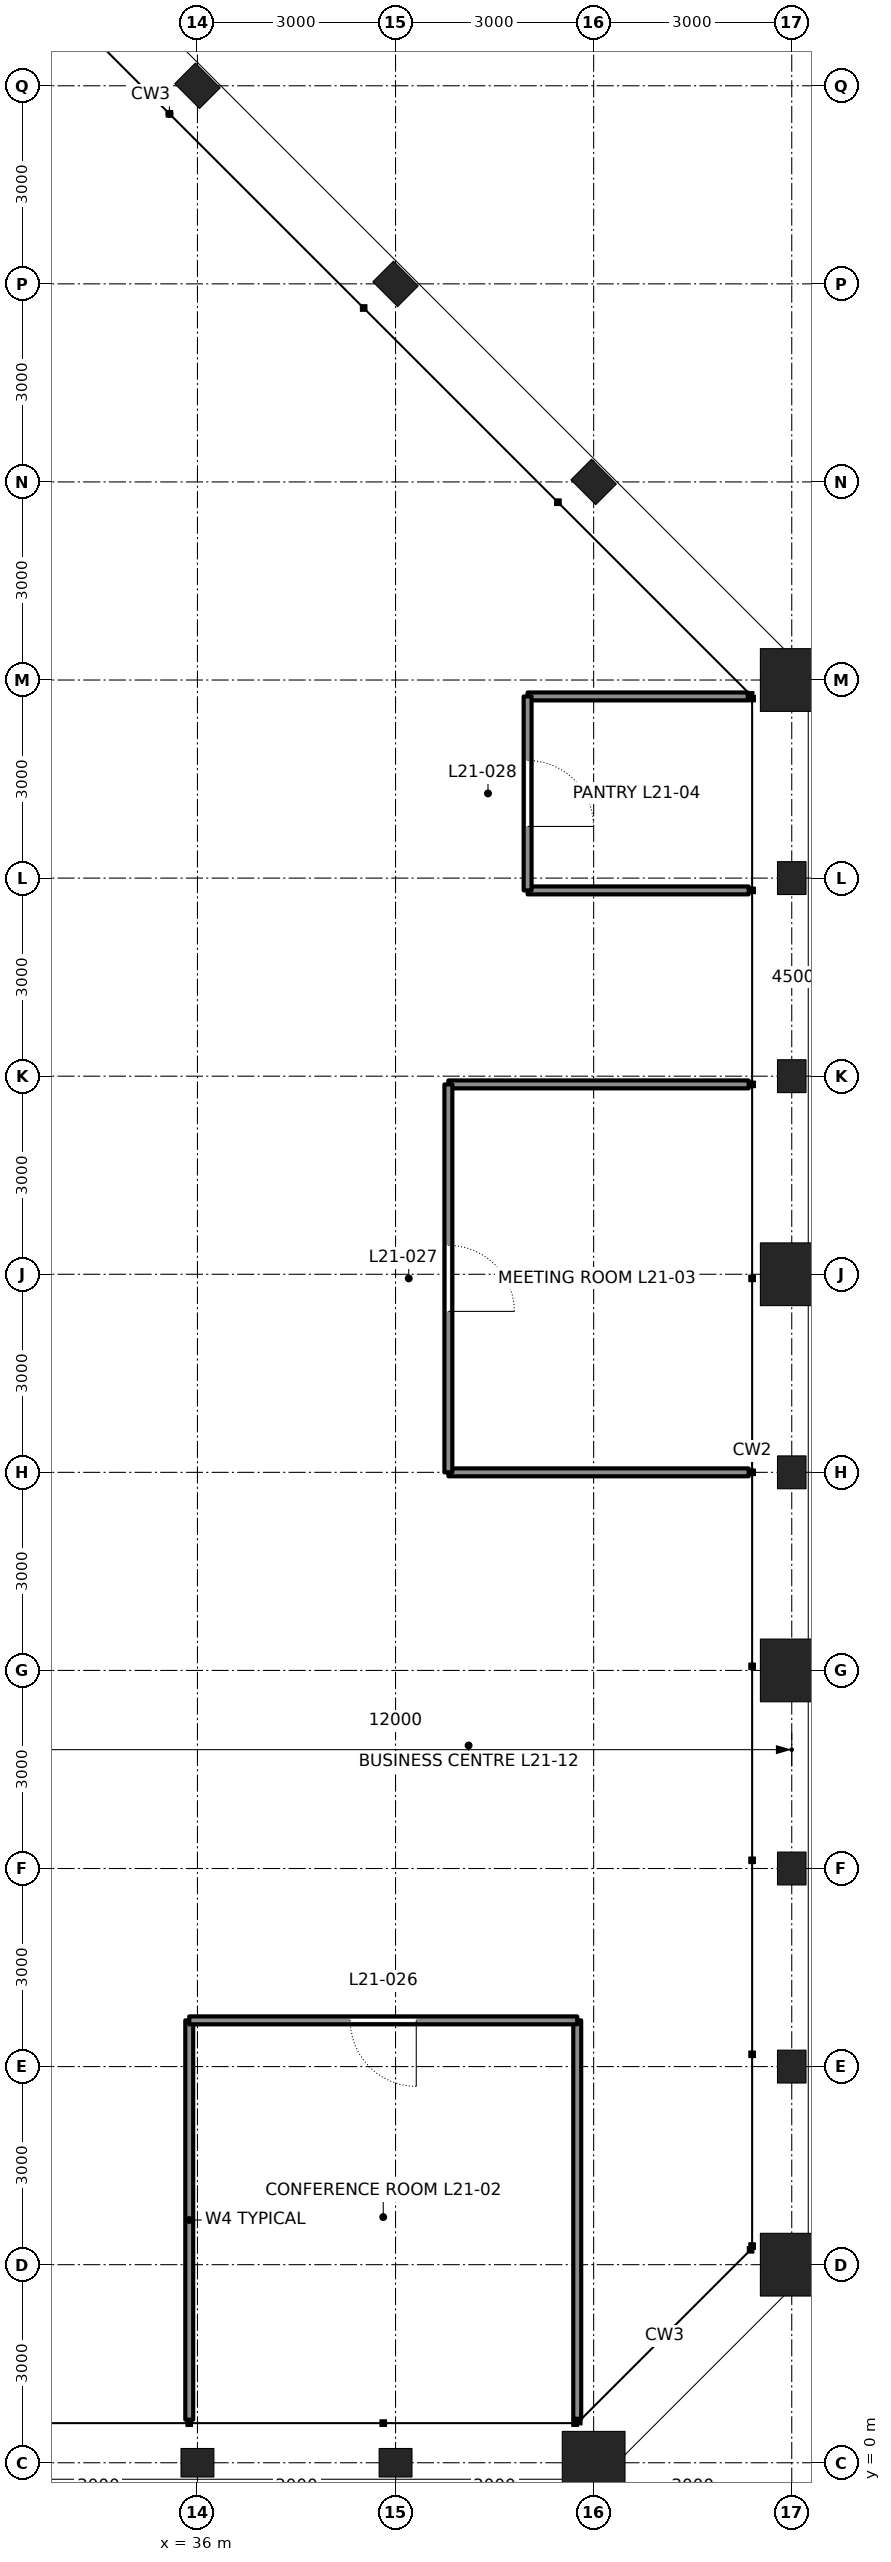
"""IFC4 building model, lengths in metres.
Left out: names, types, materials, properties, quantities, classifications, styles, units other than length and angle.
Written with IfcOpenShell. Run it as: python <this file> out.ifc"""

import sys

from ifc_helpers import new_model, si_unit, direction, frame, frame_2d, origin, origin_2d, place, context, subcontext, project, spatial, rectangle, hollow_rectangle, i_section, extrude, element, fill, save


model = new_model("IFC4")
c1 = context("Model", 3, precision=1e-05, world=origin(), true_north=direction((0.0, 1.0)))
c2 = subcontext(c1, "Body", "Model", "MODEL_VIEW")
j1 = project(units=[si_unit("LENGTHUNIT", "METRE"), si_unit("PLANEANGLEUNIT", "RADIAN")], contexts=[c1])
p1 = place(None, origin())
s1 = spatial("IfcSite", under=j1, at=p1, CompositionType="ELEMENT")
p2 = place(p1, origin())
s2 = spatial("IfcBuilding", under=s1, at=p2, CompositionType="ELEMENT")
p3 = place(p2, frame((0.0, 0.0, 102.3)))
s3 = spatial("IfcBuildingStorey", under=s2, at=p3, CompositionType="ELEMENT", Elevation=102.3)
for number, where, z_axis, x_axis in (
    (1, (36.0, 0.0, 0.0), (0.0, 0.0, 1.0), (0.0, -1.0, 0.0)),
    (2, (39.0, 0.0, 0.0), (0.0, 0.0, 1.0), (0.0, -1.0, 0.0)),
):
    element("IfcColumn", number, at=place(p3, frame(where, z_axis=z_axis, x_axis=x_axis)), inside=s3, PredefinedType="COLUMN", context=c2, shape_type="SweptSolid", body=[
        extrude(i_section(OverallWidth=0.432, OverallDepth=0.498, WebThickness=0.056, FlangeThickness=0.089, at=origin_2d()), origin(), (0.0, 0.0, 1.0), 4.5),
    ])
for number, where, z_axis, x_axis in (
    (3, (42.0, 0.0, 0.0), (0.0, 0.0, 1.0), (0.0, -1.0, 0.0)),
    (4, (45.0, 3.0, 0.0), (0.0, 0.0, 1.0), (1.0, 0.0, 0.0)),
):
    element("IfcColumn", number, at=place(p3, frame(where, z_axis=z_axis, x_axis=x_axis)), inside=s3, PredefinedType="COLUMN", context=c2, shape_type="SweptSolid", body=[
        extrude(hollow_rectangle(XDim=0.95, YDim=0.95, WallThickness=0.095, at=origin_2d()), origin(), (0.0, 0.0, 1.0), 4.5),
    ])
for number, where, z_axis, x_axis in (
    (5, (45.0, 6.0, 0.0), (0.0, 0.0, 1.0), (1.0, 0.0, 0.0)),
    (6, (45.0, 9.0, 0.0), (0.0, 0.0, 1.0), (1.0, 0.0, 0.0)),
):
    element("IfcColumn", number, at=place(p3, frame(where, z_axis=z_axis, x_axis=x_axis)), inside=s3, PredefinedType="COLUMN", context=c2, shape_type="SweptSolid", body=[
        extrude(i_section(OverallWidth=0.432, OverallDepth=0.498, WebThickness=0.056, FlangeThickness=0.089, at=origin_2d()), origin(), (0.0, 0.0, 1.0), 4.5),
    ])
p4 = place(p3, frame((45.0, 12.0, 0.0), z_axis=(0.0, 0.0, 1.0), x_axis=(1.0, 0.0, 0.0)))
e7 = element("IfcColumn", 7, at=p4, inside=s3, PredefinedType="COLUMN", context=c2, shape_type="SweptSolid", body=[
    extrude(hollow_rectangle(XDim=0.95, YDim=0.95, WallThickness=0.11, at=origin_2d()), origin(), (0.0, 0.0, 1.0), 4.5),
])
p5 = place(p3, frame((45.0, 15.0, 0.0), z_axis=(0.0, 0.0, 1.0), x_axis=(1.0, 0.0, 0.0)))
e8 = element("IfcColumn", 8, at=p5, inside=s3, PredefinedType="COLUMN", context=c2, shape_type="SweptSolid", body=[
    extrude(i_section(OverallWidth=0.432, OverallDepth=0.498, WebThickness=0.056, FlangeThickness=0.089, at=origin_2d()), origin(), (0.0, 0.0, 1.0), 4.5),
])
p6 = place(p3, frame((45.0, 18.0, 0.0), z_axis=(0.0, 0.0, 1.0), x_axis=(1.0, 0.0, 0.0)))
e9 = element("IfcColumn", 9, at=p6, inside=s3, PredefinedType="COLUMN", context=c2, shape_type="SweptSolid", body=[
    extrude(hollow_rectangle(XDim=0.95, YDim=0.95, WallThickness=0.11, at=origin_2d()), origin(), (0.0, 0.0, 1.0), 4.5),
])
for number, where, z_axis, x_axis in (
    (10, (45.0, 21.0, 0.0), (0.0, 0.0, 1.0), (1.0, 0.0, 0.0)),
    (11, (45.0, 24.0, 0.0), (0.0, 0.0, 1.0), (1.0, 0.0, 0.0)),
):
    element("IfcColumn", number, at=place(p3, frame(where, z_axis=z_axis, x_axis=x_axis)), inside=s3, PredefinedType="COLUMN", context=c2, shape_type="SweptSolid", body=[
        extrude(i_section(OverallWidth=0.432, OverallDepth=0.498, WebThickness=0.056, FlangeThickness=0.089, at=origin_2d()), origin(), (0.0, 0.0, 1.0), 4.5),
    ])
p7 = place(p3, frame((45.0, 27.0, 0.0), z_axis=(0.0, 0.0, 1.0), x_axis=(1.0, 0.0, 0.0)))
e12 = element("IfcColumn", 12, at=p7, inside=s3, PredefinedType="COLUMN", context=c2, shape_type="SweptSolid", body=[
    extrude(hollow_rectangle(XDim=0.95, YDim=0.95, WallThickness=0.095, at=origin_2d()), origin(), (0.0, 0.0, 1.0), 4.5),
])
for number, where, z_axis, x_axis in (
    (13, (42.0, 30.0, -0.91), (0.0, 0.0, 1.0), (0.707, 0.707, 0.0)),
    (14, (39.0, 33.0, -0.91), (0.0, 0.0, 1.0), (0.707, 0.707, 0.0)),
    (15, (36.0, 36.0, -0.91), (0.0, 0.0, 1.0), (0.707, 0.707, 0.0)),
):
    element("IfcColumn", number, at=place(p3, frame(where, z_axis=z_axis, x_axis=x_axis)), inside=s3, PredefinedType="COLUMN", context=c2, shape_type="SweptSolid", body=[
        extrude(i_section(OverallWidth=0.442, OverallDepth=0.531, WebThickness=0.066, FlangeThickness=0.106, at=origin_2d()), origin(), (0.0, 0.0, 1.0), 5.41),
    ])
p8 = place(p3, frame((35.876, 0.653, 0.0), z_axis=(0.0, 0.0, 1.0), x_axis=(0.0, 1.0, 0.0)))
e16 = element("IfcWall", 16, at=p8, inside=s3, PredefinedType="PARTITIONING", context=c2, shape_type="SweptSolid", body=[
    extrude(rectangle(XDim=6.047, YDim=0.12, at=frame_2d((3.024, 0.0))), origin(), (0.0, 0.0, 1.0), 4.34),
])
p9 = place(p3, frame((41.751, 0.666, 0.0), z_axis=(0.0, 0.0, 1.0), x_axis=(0.0, 1.0, 0.0)))
e17 = element("IfcWall", 17, at=p9, inside=s3, PredefinedType="PARTITIONING", context=c2, shape_type="SweptSolid", body=[
    extrude(rectangle(XDim=6.034, YDim=0.12, at=frame_2d((3.017, 0.0))), origin(), (0.0, 0.0, 1.0), 4.34),
])
p10 = place(p3, frame((35.876, 6.7, 0.0), z_axis=(0.0, 0.0, 1.0), x_axis=(1.0, 0.0, 0.0)))
e18 = element("IfcWall", 18, at=p10, inside=s3, PredefinedType="PARTITIONING", context=c2, shape_type="SweptSolid", body=[
    extrude(rectangle(XDim=5.876, YDim=0.12, at=frame_2d((2.938, 0.0))), origin(), (0.0, 0.0, 1.0), 4.34),
])
p11 = place(p10, frame((2.438, 0.0, 0.0)))
e19 = element("IfcOpeningElement", 19, at=p11, cuts=e18, PredefinedType="OPENING", context=c2, shape_type="SweptSolid", body=[
    extrude(rectangle(XDim=1.0, YDim=2.4, at=frame_2d((0.5, 1.2))), frame((0.0, 0.07, 0.0), z_axis=(0.0, -1.0, 0.0), x_axis=(1.0, 0.0, 0.0)), (0.0, 0.0, 1.0), 0.14),
])
for number, where, z_axis, x_axis in (
    (20, (44.347, 15.0, 0.0), (0.0, 0.0, 1.0), (-1.0, 0.0, 0.0)),
    (21, (44.347, 20.876, 0.0), (0.0, 0.0, 1.0), (-1.0, 0.0, 0.0)),
):
    element("IfcWall", number, at=place(p3, frame(where, z_axis=z_axis, x_axis=x_axis)), inside=s3, PredefinedType="PARTITIONING", context=c2, shape_type="SweptSolid", body=[
        extrude(rectangle(XDim=4.547, YDim=0.12, at=frame_2d((2.274, 0.0))), origin(), (0.0, 0.0, 1.0), 3.657),
    ])
p12 = place(p3, frame((44.347, 23.814, 0.0), z_axis=(0.0, 0.0, 1.0), x_axis=(-1.0, 0.0, 0.0)))
e22 = element("IfcWall", 22, at=p12, inside=s3, PredefinedType="PARTITIONING", context=c2, shape_type="SweptSolid", body=[
    extrude(rectangle(XDim=3.347, YDim=0.12, at=frame_2d((1.674, 0.0))), origin(), (0.0, 0.0, 1.0), 4.34),
])
p13 = place(p3, frame((44.334, 26.751, 0.0), z_axis=(0.0, 0.0, 1.0), x_axis=(-1.0, 0.0, 0.0)))
e23 = element("IfcWall", 23, at=p13, inside=s3, PredefinedType="PARTITIONING", context=c2, shape_type="SweptSolid", body=[
    extrude(rectangle(XDim=3.334, YDim=0.12, at=frame_2d((1.667, 0.0))), origin(), (0.0, 0.0, 1.0), 4.34),
])
p14 = place(p3, frame((39.8, 15.0, 0.0), z_axis=(0.0, 0.0, 1.0), x_axis=(0.0, 1.0, 0.0)))
e24 = element("IfcWall", 24, at=p14, inside=s3, PredefinedType="PARTITIONING", context=c2, shape_type="SweptSolid", body=[
    extrude(rectangle(XDim=5.876, YDim=0.12, at=frame_2d((2.938, 0.0))), origin(), (0.0, 0.0, 1.0), 4.34),
])
p15 = place(p14, frame((2.438, 0.0, 0.0)))
e25 = element("IfcOpeningElement", 25, at=p15, cuts=e24, PredefinedType="OPENING", context=c2, shape_type="SweptSolid", body=[
    extrude(rectangle(XDim=1.0, YDim=2.4, at=frame_2d((0.5, 1.2))), frame((0.0, 0.07, 0.0), z_axis=(0.0, -1.0, 0.0), x_axis=(1.0, 0.0, 0.0)), (0.0, 0.0, 1.0), 0.14),
])
p16 = place(p3, frame((41.0, 23.814, 0.0), z_axis=(0.0, 0.0, 1.0), x_axis=(0.0, 1.0, 0.0)))
e26 = element("IfcWall", 26, at=p16, inside=s3, PredefinedType="PARTITIONING", context=c2, shape_type="SweptSolid", body=[
    extrude(rectangle(XDim=2.938, YDim=0.12, at=frame_2d((1.469, 0.0))), origin(), (0.0, 0.0, 1.0), 4.34),
])
p17 = place(p16, frame((0.969, 0.0, 0.0)))
e27 = element("IfcOpeningElement", 27, at=p17, cuts=e26, PredefinedType="OPENING", context=c2, shape_type="SweptSolid", body=[
    extrude(rectangle(XDim=1.0, YDim=2.4, at=frame_2d((0.5, 1.2))), frame((0.0, 0.07, 0.0), z_axis=(0.0, -1.0, 0.0), x_axis=(1.0, 0.0, 0.0)), (0.0, 0.0, 1.0), 0.14),
])
p18 = place(p11, frame((1.0, 0.0, 0.0), z_axis=(0.0, 0.0, 1.0), x_axis=(-1.0, 0.0, 0.0)))
e28 = element("IfcDoor", 28, at=p18, inside=s3, OperationType="SINGLE_SWING_LEFT", PredefinedType="DOOR", context=c2, shape_type="SweptSolid", body=[
    extrude(rectangle(XDim=1.0, YDim=2.4, at=frame_2d((0.5, 1.2))), frame((0.0, 0.025, 0.0), z_axis=(0.0, -1.0, 0.0), x_axis=(1.0, 0.0, 0.0)), (0.0, 0.0, 1.0), 0.05),
])
fill(e19, e28)
p19 = place(p15, frame((1.0, 0.0, 0.0), z_axis=(0.0, 0.0, 1.0), x_axis=(-1.0, 0.0, 0.0)))
e29 = element("IfcDoor", 29, at=p19, inside=s3, OperationType="SINGLE_SWING_RIGHT", PredefinedType="DOOR", context=c2, shape_type="SweptSolid", body=[
    extrude(rectangle(XDim=1.0, YDim=2.4, at=frame_2d((0.5, 1.2))), frame((0.0, 0.025, 0.0), z_axis=(0.0, -1.0, 0.0), x_axis=(1.0, 0.0, 0.0)), (0.0, 0.0, 1.0), 0.05),
])
fill(e25, e29)
p20 = place(p17, frame((1.0, 0.0, 0.0), z_axis=(0.0, 0.0, 1.0), x_axis=(-1.0, 0.0, 0.0)))
e30 = element("IfcDoor", 30, at=p20, inside=s3, OperationType="SINGLE_SWING_RIGHT", PredefinedType="DOOR", context=c2, shape_type="SweptSolid", body=[
    extrude(rectangle(XDim=1.0, YDim=2.4, at=frame_2d((0.5, 1.2))), frame((0.0, 0.025, 0.0), z_axis=(0.0, -1.0, 0.0), x_axis=(1.0, 0.0, 0.0)), (0.0, 0.0, 1.0), 0.05),
])
fill(e27, e30)
save(model, sys.argv[1])
